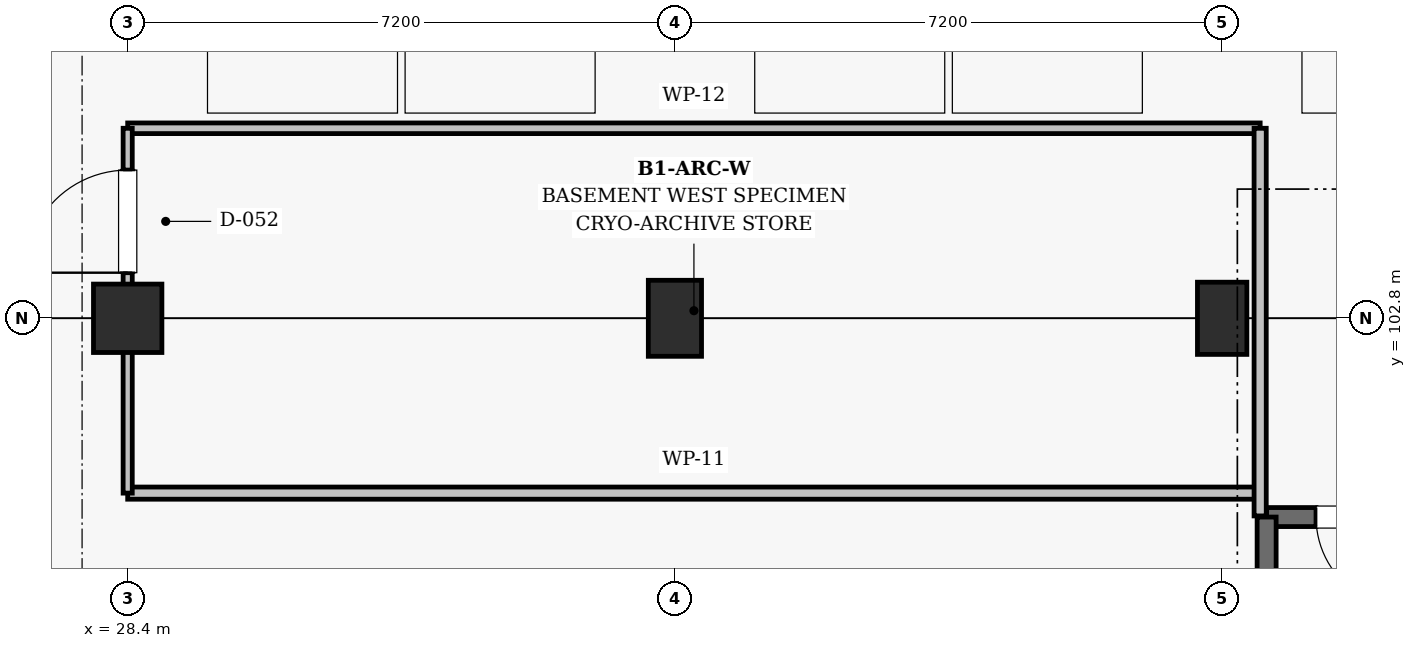
"""IFC4 building model, lengths in metres.
Left out: names, types, materials, properties, quantities, classifications, styles, units other than length and angle.
Written with IfcOpenShell. Run it as: python <this file> out.ifc"""

import sys

from ifc_helpers import new_model, si_unit, direction, frame, frame_2d, origin, origin_2d, place, context, subcontext, project, spatial, rectangle, extrude, element, fill, save


model = new_model("IFC4")
c1 = context("Model", 3, precision=1e-05, world=origin(), true_north=direction((0.0, 1.0)))
c2 = subcontext(c1, "Body", "Model", "MODEL_VIEW")
j1 = project(units=[si_unit("LENGTHUNIT", "METRE"), si_unit("PLANEANGLEUNIT", "RADIAN")], contexts=[c1])
p1 = place(None, origin())
s1 = spatial("IfcSite", under=j1, at=p1, CompositionType="ELEMENT")
p2 = place(p1, origin())
s2 = spatial("IfcBuilding", under=s1, at=p2, CompositionType="ELEMENT")
p3 = place(p2, frame((0.0, 0.0, -4.5)))
s3 = spatial("IfcBuildingStorey", under=s2, at=p3, CompositionType="ELEMENT", Elevation=-4.5)
p4 = place(p3, frame((28.4, 102.8, 0.0), z_axis=(0.0, 0.0, 1.0), x_axis=(1.0, 0.0, 0.0)))
e1 = element("IfcColumn", 1, at=p4, inside=s3, PredefinedType="COLUMN", context=c2, shape_type="SweptSolid", body=[
    extrude(rectangle(XDim=0.9, YDim=0.9, at=origin_2d()), origin(), (0.0, 0.0, 1.0), 4.5),
])
p5 = place(p3, frame((35.6, 102.8, 0.0), z_axis=(0.0, 0.0, 1.0), x_axis=(1.0, 0.0, 0.0)))
e2 = element("IfcColumn", 2, at=p5, inside=s3, PredefinedType="COLUMN", context=c2, shape_type="SweptSolid", body=[
    extrude(rectangle(XDim=0.7, YDim=1.0, at=origin_2d()), origin(), (0.0, 0.0, 1.0), 4.5),
])
p6 = place(p3, frame((42.8, 102.8, 0.0), z_axis=(0.0, 0.0, 1.0), x_axis=(1.0, 0.0, 0.0)))
e3 = element("IfcColumn", 3, at=p6, inside=s3, PredefinedType="COLUMN", context=c2, shape_type="SweptSolid", body=[
    extrude(rectangle(XDim=0.65, YDim=0.95, at=origin_2d()), origin(), (0.0, 0.0, 1.0), 4.5),
])
p7 = place(p3, frame((54.015, 100.185, 0.0), z_axis=(0.0, 0.0, 1.0), x_axis=(-1.0, 0.0, 0.0)))
e4 = element("IfcWall", 4, at=p7, inside=s3, PredefinedType="SHEAR", context=c2, shape_type="SweptSolid", body=[
    extrude(rectangle(XDim=10.63, YDim=0.25, at=frame_2d((5.315, 0.0))), origin(), (0.0, 0.0, 1.0), 4.215),
])
p8 = place(p7, frame((8.78, 0.0, 0.0)))
e5 = element("IfcOpeningElement", 5, at=p8, cuts=e4, PredefinedType="OPENING", context=c2, shape_type="SweptSolid", body=[
    extrude(rectangle(XDim=1.2, YDim=2.15, at=frame_2d((0.6, 1.075))), frame((0.0, 0.135, 0.0), z_axis=(0.0, -1.0, 0.0), x_axis=(1.0, 0.0, 0.0)), (0.0, 0.0, 1.0), 0.27),
])
p9 = place(p3, frame((43.385, 100.185, 0.0), z_axis=(0.0, 0.0, 1.0), x_axis=(0.0, -1.0, 0.0)))
e6 = element("IfcWall", 6, at=p9, inside=s3, PredefinedType="SHEAR", context=c2, shape_type="SweptSolid", body=[
    extrude(rectangle(XDim=5.1, YDim=0.25, at=frame_2d((2.55, 0.0))), origin(), (0.0, 0.0, 1.0), 4.215),
])
p10 = place(p3, frame((28.4, 100.5, 0.0), z_axis=(0.0, 0.0, 1.0), x_axis=(1.0, 0.0, 0.0)))
e7 = element("IfcWall", 7, at=p10, inside=s3, PredefinedType="PARTITIONING", context=c2, shape_type="SweptSolid", body=[
    extrude(rectangle(XDim=14.9, YDim=0.16, at=frame_2d((7.45, 0.0))), origin(), (0.0, 0.0, 1.0), 2.96),
])
p11 = place(p3, frame((28.4, 105.3, 0.0), z_axis=(0.0, 0.0, 1.0), x_axis=(1.0, 0.0, 0.0)))
e8 = element("IfcWall", 8, at=p11, inside=s3, PredefinedType="PARTITIONING", context=c2, shape_type="SweptSolid", body=[
    extrude(rectangle(XDim=14.9, YDim=0.14, at=frame_2d((7.45, 0.0))), origin(), (0.0, 0.0, 1.0), 2.96),
])
p12 = place(p3, frame((28.4, 100.5, 0.0), z_axis=(0.0, 0.0, 1.0), x_axis=(0.0, 1.0, 0.0)))
e9 = element("IfcWall", 9, at=p12, inside=s3, PredefinedType="PARTITIONING", context=c2, shape_type="SweptSolid", body=[
    extrude(rectangle(XDim=4.8, YDim=0.12, at=frame_2d((2.4, 0.0))), origin(), (0.0, 0.0, 1.0), 3.61),
])
p13 = place(p12, frame((2.9, 0.0, 0.0)))
e10 = element("IfcOpeningElement", 10, at=p13, cuts=e9, PredefinedType="OPENING", context=c2, shape_type="SweptSolid", body=[
    extrude(rectangle(XDim=1.35, YDim=2.2, at=frame_2d((0.675, 1.1))), frame((0.0, 0.07, 0.0), z_axis=(0.0, -1.0, 0.0), x_axis=(1.0, 0.0, 0.0)), (0.0, 0.0, 1.0), 0.14),
])
p14 = place(p3, frame((43.3, 100.2, 0.0), z_axis=(0.0, 0.0, 1.0), x_axis=(0.0, 1.0, 0.0)))
e11 = element("IfcWall", 11, at=p14, inside=s3, PredefinedType="PARTITIONING", context=c2, shape_type="SweptSolid", body=[
    extrude(rectangle(XDim=5.1, YDim=0.16, at=frame_2d((2.55, 0.0))), origin(), (0.0, 0.0, 1.0), 3.41),
])
p15 = place(p8, origin())
e12 = element("IfcDoor", 12, at=p15, inside=s3, OperationType="SINGLE_SWING_LEFT", PredefinedType="DOOR", context=c2, shape_type="SweptSolid", body=[
    extrude(rectangle(XDim=1.2, YDim=2.15, at=frame_2d((0.6, 1.075))), frame((0.0, 0.025, 0.0), z_axis=(0.0, -1.0, 0.0), x_axis=(1.0, 0.0, 0.0)), (0.0, 0.0, 1.0), 0.05),
])
fill(e5, e12)
p16 = place(p13, origin())
e13 = element("IfcDoor", 13, at=p16, inside=s3, OperationType="SINGLE_SWING_LEFT", PredefinedType="DOOR", context=c2, shape_type="SweptSolid", body=[
    extrude(rectangle(XDim=1.35, YDim=2.2, at=frame_2d((0.675, 1.1))), frame((0.0, 0.025, 0.0), z_axis=(0.0, -1.0, 0.0), x_axis=(1.0, 0.0, 0.0)), (0.0, 0.0, 1.0), 0.05),
])
fill(e10, e13)
save(model, sys.argv[1])
